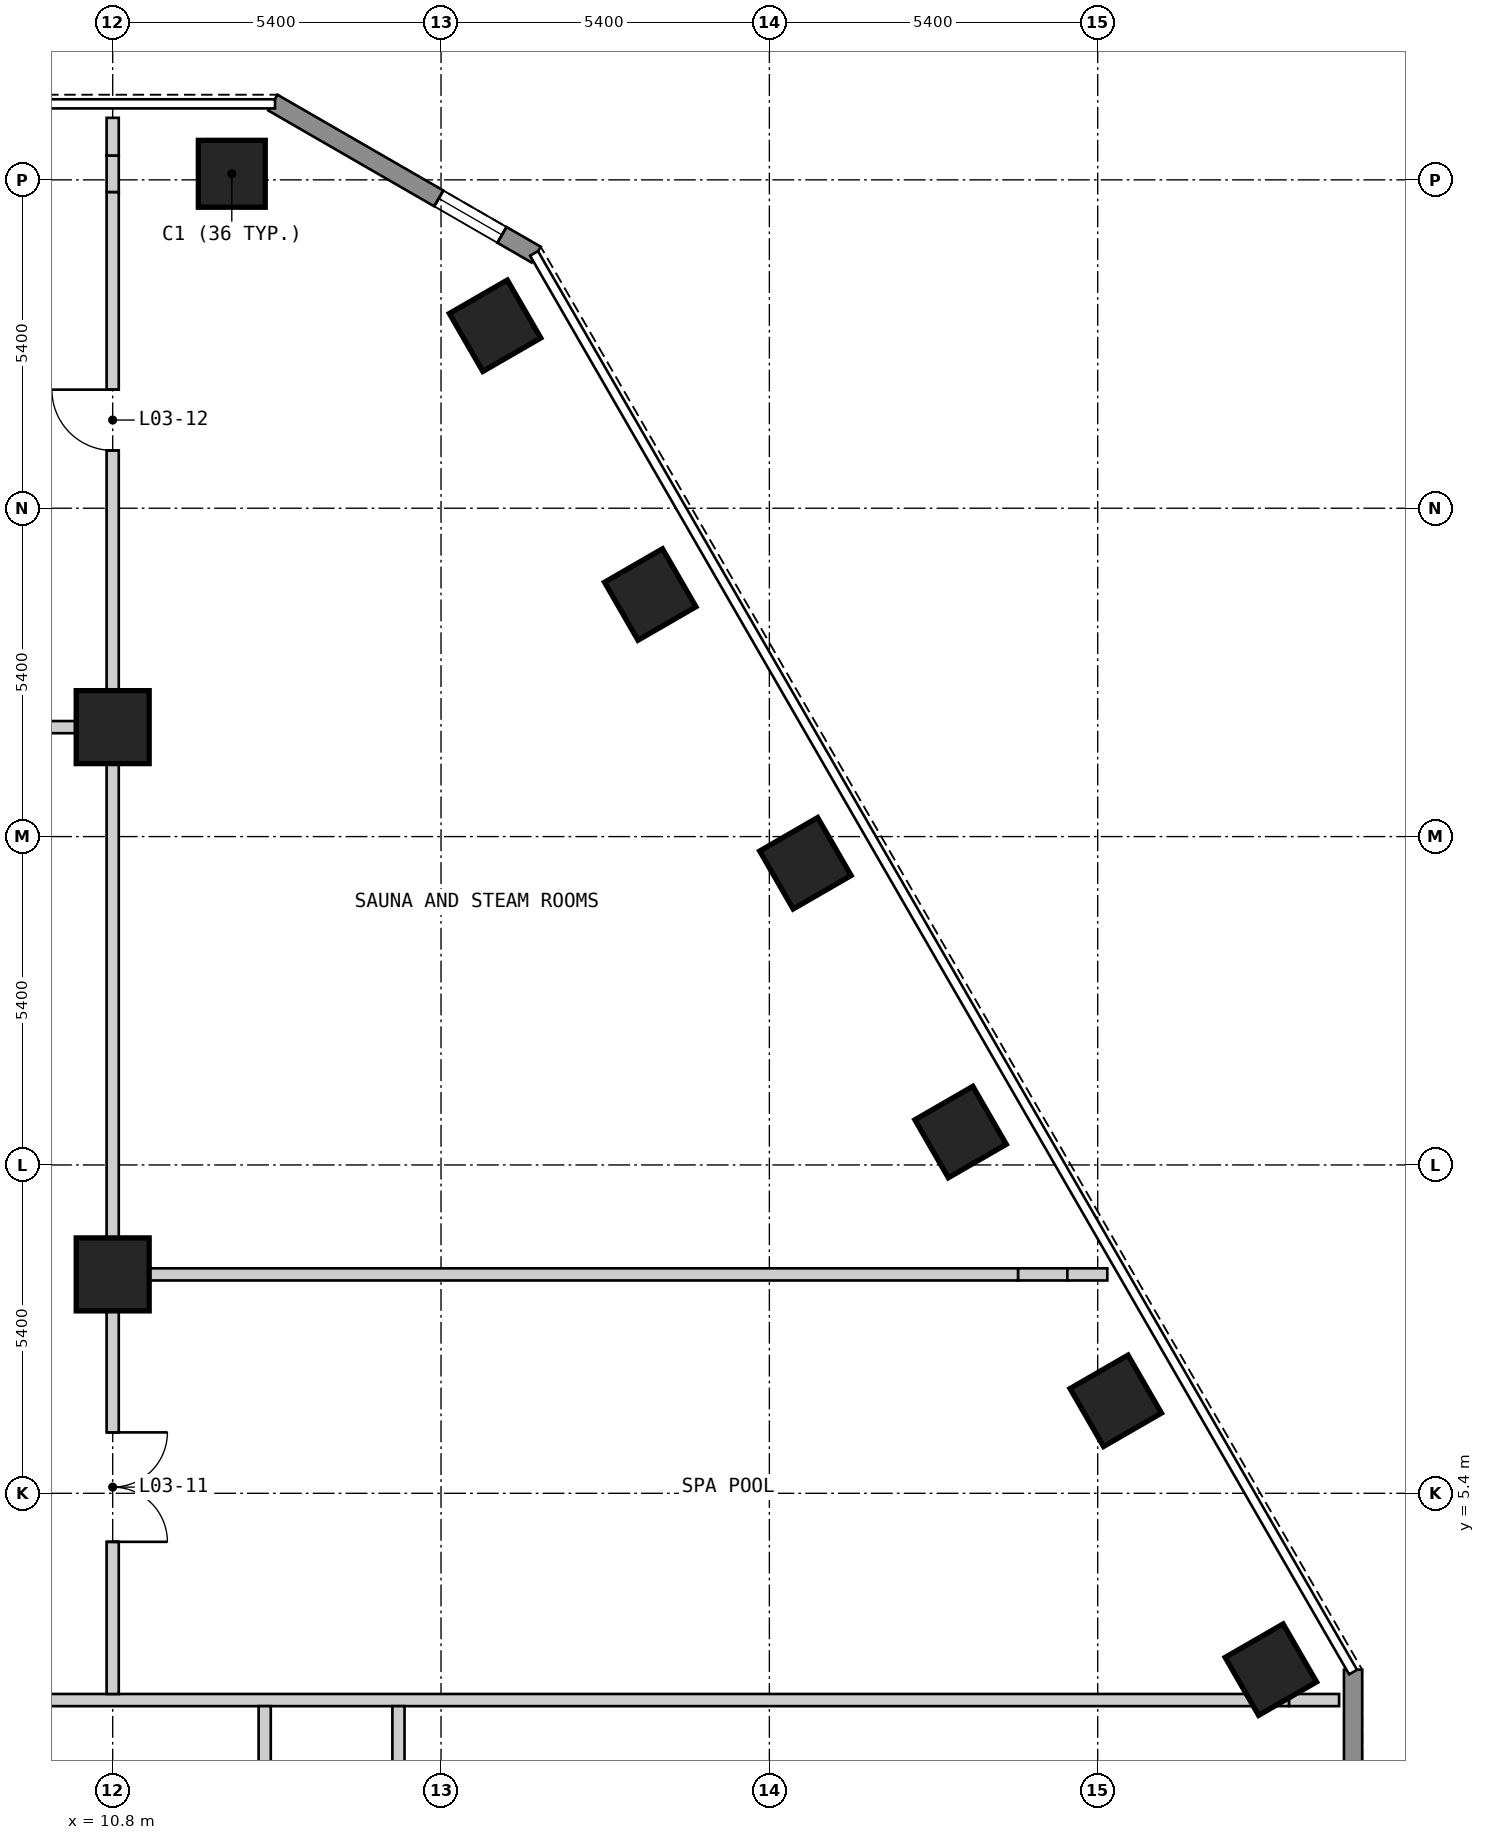
"""IFC4 building model, lengths in metres.
Left out: names, types, materials, properties, quantities, classifications, styles, units other than length and angle.
Written with IfcOpenShell. Run it as: python <this file> out.ifc"""

import sys

from ifc_helpers import new_model, si_unit, direction, frame, frame_2d, origin, origin_2d, place, context, subcontext, project, spatial, polyline, rectangle, outline, extrude, element, fill, save


model = new_model("IFC4")
c1 = context("Model", 3, precision=1e-05, world=origin(), true_north=direction((0.0, 1.0)))
c2 = subcontext(c1, "Body", "Model", "MODEL_VIEW")
j1 = project(units=[si_unit("LENGTHUNIT", "METRE"), si_unit("PLANEANGLEUNIT", "RADIAN")], contexts=[c1])
p1 = place(None, origin())
s1 = spatial("IfcSite", under=j1, at=p1, CompositionType="ELEMENT")
p2 = place(p1, origin())
s2 = spatial("IfcBuilding", under=s1, at=p2, CompositionType="ELEMENT")
p3 = place(p2, frame((0.0, 0.0, 12.6)))
s3 = spatial("IfcBuildingStorey", under=s2, at=p3, CompositionType="ELEMENT", Elevation=12.6)
for number, where, z_axis, x_axis in (
    (1, (12.759, 27.1, 0.0), (0.0, 0.0, 1.0), (-1.0, 0.0, 0.0)),
    (2, (29.848, 2.5, 0.0), (0.0, 0.0, 1.0), (-0.5, 0.866, 0.0)),
    (3, (27.297, 6.921, 0.0), (0.0, 0.0, 1.0), (-0.5, 0.866, 0.0)),
    (4, (24.745, 11.341, 0.0), (0.0, 0.0, 1.0), (-0.5, 0.866, 0.0)),
    (5, (22.193, 15.761, 0.0), (0.0, 0.0, 1.0), (-0.5, 0.866, 0.0)),
    (6, (19.641, 20.181, 0.0), (0.0, 0.0, 1.0), (-0.5, 0.866, 0.0)),
    (7, (17.089, 24.601, 0.0), (0.0, 0.0, 1.0), (-0.5, 0.866, 0.0)),
):
    element("IfcColumn", number, at=place(p3, frame(where, z_axis=z_axis, x_axis=x_axis)), inside=s3, PredefinedType="COLUMN", context=c2, shape_type="SweptSolid", body=[
        extrude(rectangle(XDim=1.1, YDim=1.1, at=origin_2d()), origin(), (0.0, 0.0, 1.0), 3.6),
    ])
for number, where, z_axis, x_axis in (
    (8, (10.8, 9.0, 0.0), (0.0, 0.0, 1.0), (1.0, 0.0, 0.0)),
    (9, (10.8, 18.0, 0.0), (0.0, 0.0, 1.0), (1.0, 0.0, 0.0)),
):
    element("IfcColumn", number, at=place(p3, frame(where, z_axis=z_axis, x_axis=x_axis)), inside=s3, PredefinedType="COLUMN", context=c2, shape_type="SweptSolid", body=[
        extrude(rectangle(XDim=1.2, YDim=1.2, at=origin_2d()), origin(), (0.0, 0.0, 1.0), 3.6),
    ])
p4 = place(p3, frame((31.2, -2.5, 0.0), z_axis=(0.0, 0.0, 1.0), x_axis=(0.0, 1.0, 0.0)))
e10 = element("IfcWall", 10, at=p4, inside=s3, PredefinedType="SOLIDWALL", context=c2, shape_type="SweptSolid", body=[
    extrude(outline(polyline([(0.0, -0.15), (5.0, -0.15), (4.92, 0.15), (0.08, 0.15), (0.0, -0.15)])), origin(), (0.0, 0.0, 1.0), 3.25),
])
p5 = place(p4, frame((0.65, 0.0, 0.15)))
e11 = element("IfcOpeningElement", 11, at=p5, cuts=e10, PredefinedType="OPENING", context=c2, shape_type="SweptSolid", body=[
    extrude(rectangle(XDim=1.2, YDim=2.1, at=frame_2d((0.6, 1.05))), frame((0.0, 0.16, 0.0), z_axis=(0.0, -1.0, 0.0), x_axis=(1.0, 0.0, 0.0)), (0.0, 0.0, 1.0), 0.32),
])
p6 = place(p3, frame((17.765, 25.77, 0.0), z_axis=(0.0, 0.0, 1.0), x_axis=(-0.866010750942, 0.50002537861, 0.0)))
e12 = element("IfcWall", 12, at=p6, inside=s3, PredefinedType="SOLIDWALL", context=c2, shape_type="SweptSolid", body=[
    extrude(outline(polyline([(0.0, -0.15), (5.0, -0.15), (4.919, 0.15), (0.08, 0.15), (0.0, -0.15)])), origin(), (0.0, 0.0, 1.0), 3.25),
])
p7 = place(p6, frame((0.65, 0.0, 0.15)))
e13 = element("IfcOpeningElement", 13, at=p7, cuts=e12, PredefinedType="OPENING", context=c2, shape_type="SweptSolid", body=[
    extrude(rectangle(XDim=1.2, YDim=2.1, at=frame_2d((0.6, 1.05))), frame((0.0, 0.16, 0.0), z_axis=(0.0, -1.0, 0.0), x_axis=(1.0, 0.0, 0.0)), (0.0, 0.0, 1.0), 0.32),
])
p8 = place(p3, frame((-29.549, 2.0, 0.0), z_axis=(0.0, 0.0, 1.0), x_axis=(1.0, 0.0, 0.0)))
e14 = element("IfcWall", 14, at=p8, inside=s3, PredefinedType="PARTITIONING", context=c2, shape_type="SweptSolid", body=[
    extrude(rectangle(XDim=59.097, YDim=0.2, at=frame_2d((29.549, 0.0))), origin(), (0.0, 0.0, 1.0), 3.25),
])
p9 = place(p8, frame((21.517, 0.0, 0.0)))
e15 = element("IfcOpeningElement", 15, at=p9, cuts=e14, PredefinedType="OPENING", context=c2, shape_type="SweptSolid", body=[
    extrude(rectangle(XDim=1.8, YDim=2.1, at=frame_2d((0.9, 1.05))), frame((0.0, 0.11, 0.0), z_axis=(0.0, -1.0, 0.0), x_axis=(1.0, 0.0, 0.0)), (0.0, 0.0, 1.0), 0.22),
])
p10 = place(p8, frame((35.781, 0.0, 0.0)))
e16 = element("IfcOpeningElement", 16, at=p10, cuts=e14, PredefinedType="OPENING", context=c2, shape_type="SweptSolid", body=[
    extrude(rectangle(XDim=1.8, YDim=2.1, at=frame_2d((0.9, 1.05))), frame((0.0, 0.11, 0.0), z_axis=(0.0, -1.0, 0.0), x_axis=(1.0, 0.0, 0.0)), (0.0, 0.0, 1.0), 0.22),
])
p11 = place(p3, frame((29.548, 2.0, 0.0), z_axis=(0.0, 0.0, 1.0), x_axis=(1.0, 0.0, 0.0)))
e17 = element("IfcWall", 17, at=p11, inside=s3, PredefinedType="PARTITIONING", context=c2, shape_type="SweptSolid", body=[
    extrude(rectangle(XDim=0.6, YDim=0.2, at=frame_2d((0.3, 0.0))), origin(), (0.0, 0.0, 1.0), 2.52),
])
p12 = place(p3, frame((30.148, 2.0, 0.0), z_axis=(0.0, 0.0, 1.0), x_axis=(1.0, 0.0, 0.0)))
e18 = element("IfcWall", 18, at=p12, inside=s3, PredefinedType="PARTITIONING", context=c2, shape_type="SweptSolid", body=[
    extrude(rectangle(XDim=0.822, YDim=0.2, at=frame_2d((0.411, 0.0))), origin(), (0.0, 0.0, 1.0), 3.25),
])
p13 = place(p3, frame((10.9, 9.0, 0.0), z_axis=(0.0, 0.0, 1.0), x_axis=(1.0, 0.0, 0.0)))
e19 = element("IfcWall", 19, at=p13, inside=s3, PredefinedType="PARTITIONING", context=c2, shape_type="SweptSolid", body=[
    extrude(rectangle(XDim=14.792, YDim=0.2, at=frame_2d((7.396, 0.0))), origin(), (0.0, 0.0, 1.0), 3.25),
])
p14 = place(p3, frame((25.692, 9.0, 0.0), z_axis=(0.0, 0.0, 1.0), x_axis=(1.0, 0.0, 0.0)))
e20 = element("IfcWall", 20, at=p14, inside=s3, PredefinedType="PARTITIONING", context=c2, shape_type="SweptSolid", body=[
    extrude(rectangle(XDim=0.809, YDim=0.2, at=frame_2d((0.405, 0.0))), origin(), (0.0, 0.0, 1.0), 2.52),
])
p15 = place(p3, frame((26.501, 9.0, 0.0), z_axis=(0.0, 0.0, 1.0), x_axis=(1.0, 0.0, 0.0)))
e21 = element("IfcWall", 21, at=p15, inside=s3, PredefinedType="PARTITIONING", context=c2, shape_type="SweptSolid", body=[
    extrude(rectangle(XDim=0.657, YDim=0.2, at=frame_2d((0.329, 0.0))), origin(), (0.0, 0.0, 1.0), 3.25),
])
p16 = place(p3, frame((-10.7, 18.0, 0.0), z_axis=(0.0, 0.0, 1.0), x_axis=(1.0, 0.0, 0.0)))
e22 = element("IfcWall", 22, at=p16, inside=s3, PredefinedType="PARTITIONING", context=c2, shape_type="SweptSolid", body=[
    extrude(rectangle(XDim=21.4, YDim=0.2, at=frame_2d((10.7, 0.0))), origin(), (0.0, 0.0, 1.0), 3.25),
])
p17 = place(p16, frame((9.67, 0.0, 0.0), z_axis=(0.0, 0.0, 1.0), x_axis=(-1.0, 0.0, 0.0)))
e23 = element("IfcOpeningElement", 23, at=p17, cuts=e22, PredefinedType="OPENING", context=c2, shape_type="SweptSolid", body=[
    extrude(rectangle(XDim=1.8, YDim=2.1, at=frame_2d((0.9, 1.05))), frame((0.0, 0.11, 0.0), z_axis=(0.0, -1.0, 0.0), x_axis=(1.0, 0.0, 0.0)), (0.0, 0.0, 1.0), 0.22),
])
p18 = place(p3, frame((10.8, 2.1, 0.0), z_axis=(0.0, 0.0, 1.0), x_axis=(0.0, 1.0, 0.0)))
e24 = element("IfcWall", 24, at=p18, inside=s3, PredefinedType="PARTITIONING", context=c2, shape_type="SweptSolid", body=[
    extrude(rectangle(XDim=24.7, YDim=0.2, at=frame_2d((12.35, 0.0))), origin(), (0.0, 0.0, 1.0), 3.25),
])
p19 = place(p18, frame((4.302, 0.0, 0.0), z_axis=(0.0, 0.0, 1.0), x_axis=(-1.0, 0.0, 0.0)))
e25 = element("IfcOpeningElement", 25, at=p19, cuts=e24, PredefinedType="OPENING", context=c2, shape_type="SweptSolid", body=[
    extrude(rectangle(XDim=1.8, YDim=2.1, at=frame_2d((0.9, 1.05))), frame((0.0, 0.11, 0.0), z_axis=(0.0, -1.0, 0.0), x_axis=(1.0, 0.0, 0.0)), (0.0, 0.0, 1.0), 0.22),
])
p20 = place(p18, frame((21.45, 0.0, 0.0), z_axis=(0.0, 0.0, 1.0), x_axis=(-1.0, 0.0, 0.0)))
e26 = element("IfcOpeningElement", 26, at=p20, cuts=e24, PredefinedType="OPENING", context=c2, shape_type="SweptSolid", body=[
    extrude(rectangle(XDim=1.0, YDim=2.1, at=frame_2d((0.5, 1.05))), frame((0.0, 0.11, 0.0), z_axis=(0.0, -1.0, 0.0), x_axis=(1.0, 0.0, 0.0)), (0.0, 0.0, 1.0), 0.22),
])
p21 = place(p3, frame((10.8, 26.8, 0.0), z_axis=(0.0, 0.0, 1.0), x_axis=(0.0, 1.0, 0.0)))
e27 = element("IfcWall", 27, at=p21, inside=s3, PredefinedType="PARTITIONING", context=c2, shape_type="SweptSolid", body=[
    extrude(rectangle(XDim=0.6, YDim=0.2, at=frame_2d((0.3, 0.0))), origin(), (0.0, 0.0, 1.0), 2.52),
])
p22 = place(p3, frame((10.8, 27.4, 0.0), z_axis=(0.0, 0.0, 1.0), x_axis=(0.0, 1.0, 0.0)))
e28 = element("IfcWall", 28, at=p22, inside=s3, PredefinedType="PARTITIONING", context=c2, shape_type="SweptSolid", body=[
    extrude(rectangle(XDim=0.62, YDim=0.2, at=frame_2d((0.31, 0.0))), origin(), (0.0, 0.0, 1.0), 3.25),
])
p23 = place(p3, frame((13.3, -4.88, 0.0), z_axis=(0.0, 0.0, 1.0), x_axis=(0.0, 1.0, 0.0)))
e29 = element("IfcWall", 29, at=p23, inside=s3, PredefinedType="PARTITIONING", context=c2, shape_type="SweptSolid", body=[
    extrude(rectangle(XDim=6.78, YDim=0.2, at=frame_2d((3.39, 0.0))), origin(), (0.0, 0.0, 1.0), 3.25),
])
p24 = place(p3, frame((15.5, -25.114, 0.0), z_axis=(0.0, 0.0, 1.0), x_axis=(0.0, 1.0, 0.0)))
e30 = element("IfcWall", 30, at=p24, inside=s3, PredefinedType="PARTITIONING", context=c2, shape_type="SweptSolid", body=[
    extrude(rectangle(XDim=27.014, YDim=0.2, at=frame_2d((13.507, 0.0))), origin(), (0.0, 0.0, 1.0), 3.25),
])
p25 = place(p24, frame((10.516, 0.0, 0.0), z_axis=(0.0, 0.0, 1.0), x_axis=(-1.0, 0.0, 0.0)))
e31 = element("IfcOpeningElement", 31, at=p25, cuts=e30, PredefinedType="OPENING", context=c2, shape_type="SweptSolid", body=[
    extrude(rectangle(XDim=1.0, YDim=2.1, at=frame_2d((0.5, 1.05))), frame((0.0, 0.11, 0.0), z_axis=(0.0, -1.0, 0.0), x_axis=(1.0, 0.0, 0.0)), (0.0, 0.0, 1.0), 0.22),
])
p26 = place(p24, frame((22.112, 0.0, 0.0), z_axis=(0.0, 0.0, 1.0), x_axis=(-1.0, 0.0, 0.0)))
e32 = element("IfcOpeningElement", 32, at=p26, cuts=e30, PredefinedType="OPENING", context=c2, shape_type="SweptSolid", body=[
    extrude(rectangle(XDim=1.0, YDim=2.1, at=frame_2d((0.5, 1.05))), frame((0.0, 0.11, 0.0), z_axis=(0.0, -1.0, 0.0), x_axis=(1.0, 0.0, 0.0)), (0.0, 0.0, 1.0), 0.22),
])
p27 = place(p7, origin())
e33 = element("IfcWindow", 33, at=p27, inside=s3, PartitioningType="SINGLE_PANEL", PredefinedType="WINDOW", context=c2, shape_type="SweptSolid", body=[
    extrude(rectangle(XDim=1.2, YDim=2.1, at=frame_2d((0.6, 1.05))), frame((0.0, 0.03, 0.0), z_axis=(0.0, -1.0, 0.0), x_axis=(1.0, 0.0, 0.0)), (0.0, 0.0, 1.0), 0.06),
])
fill(e13, e33)
p28 = place(p19, origin())
e34 = element("IfcDoor", 34, at=p28, inside=s3, OperationType="DOUBLE_DOOR_SINGLE_SWING", PredefinedType="DOOR", context=c2, shape_type="SweptSolid", body=[
    extrude(rectangle(XDim=1.8, YDim=2.1, at=frame_2d((0.9, 1.05))), frame((0.0, 0.025, 0.0), z_axis=(0.0, -1.0, 0.0), x_axis=(1.0, 0.0, 0.0)), (0.0, 0.0, 1.0), 0.05),
])
fill(e25, e34)
p29 = place(p20, origin())
e35 = element("IfcDoor", 35, at=p29, inside=s3, OperationType="SINGLE_SWING_LEFT", PredefinedType="DOOR", context=c2, shape_type="SweptSolid", body=[
    extrude(rectangle(XDim=1.0, YDim=2.1, at=frame_2d((0.5, 1.05))), frame((0.0, 0.025, 0.0), z_axis=(0.0, -1.0, 0.0), x_axis=(1.0, 0.0, 0.0)), (0.0, 0.0, 1.0), 0.05),
])
fill(e26, e35)
save(model, sys.argv[1])
